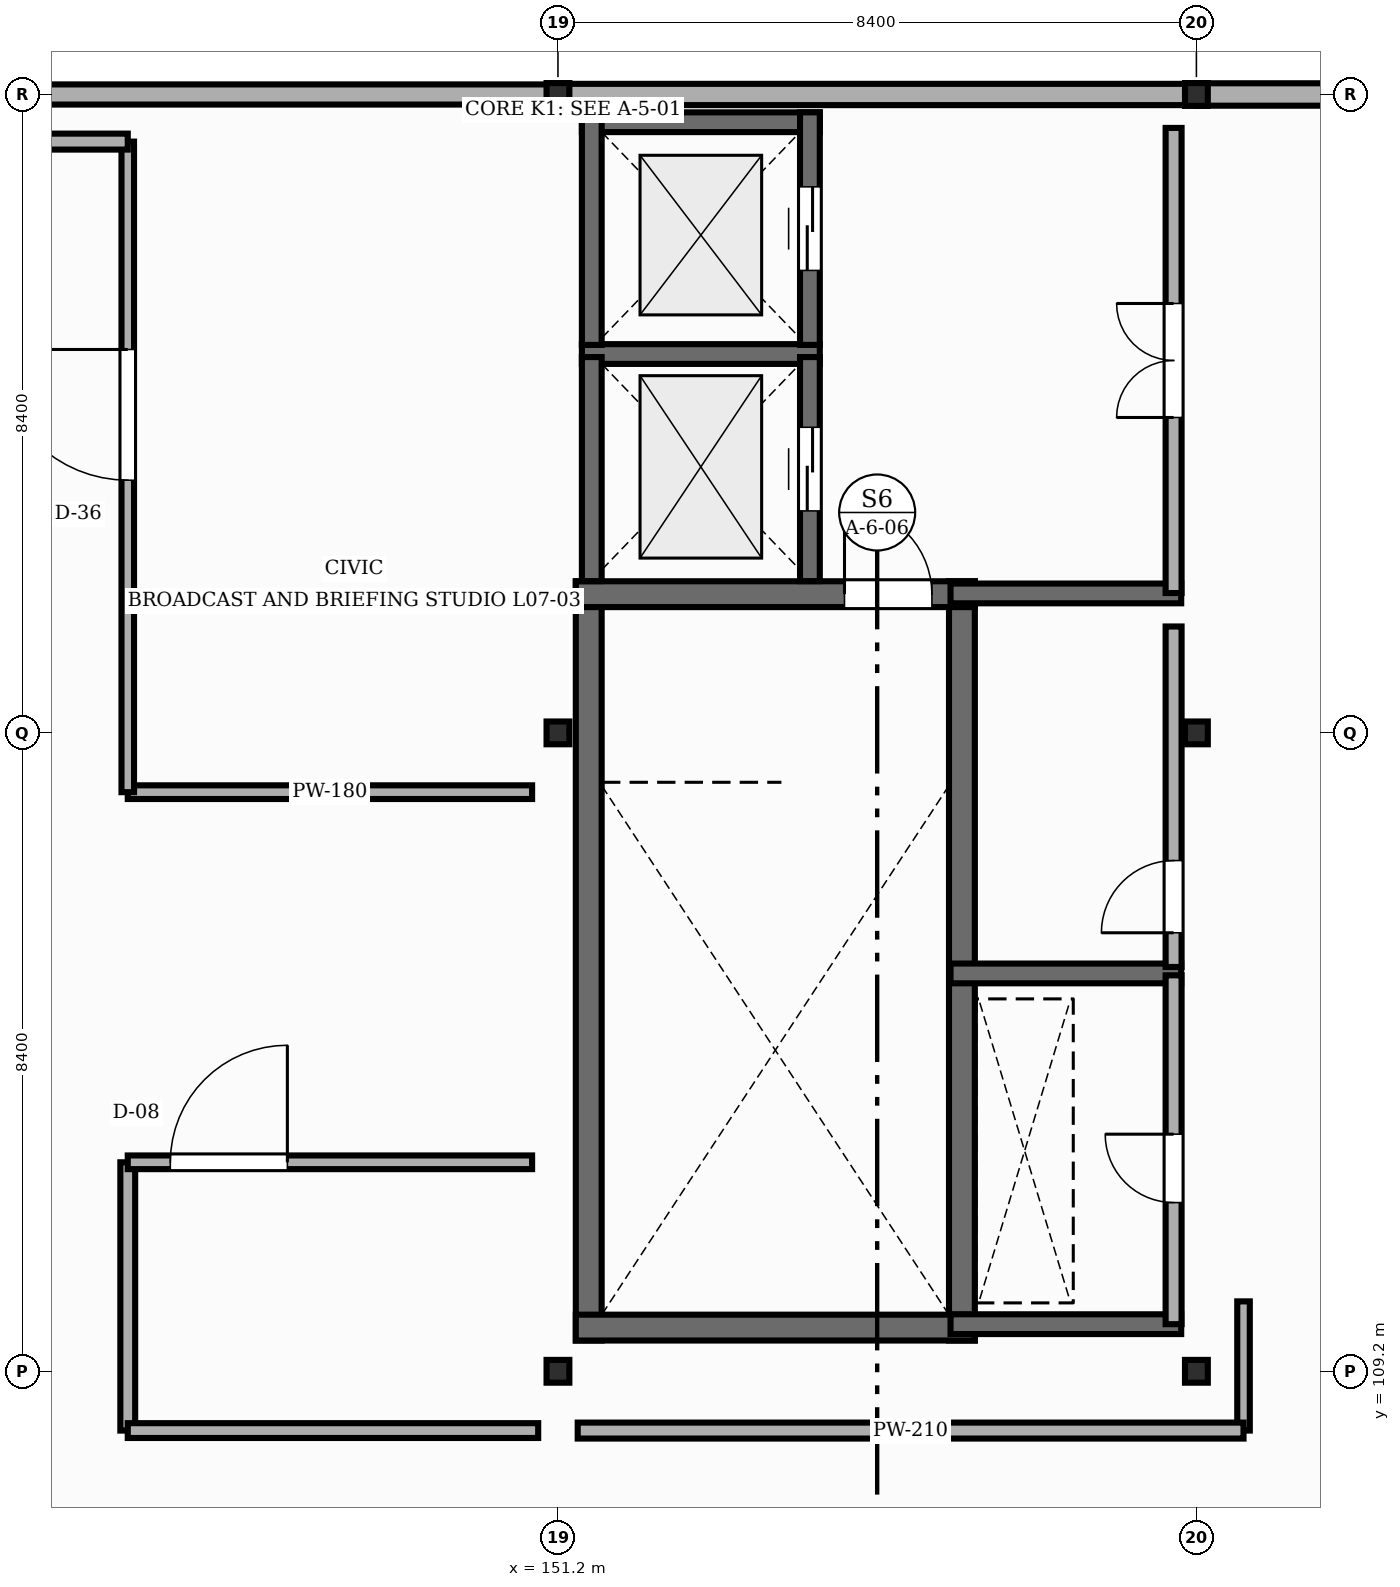
"""IFC4 building model, lengths in metres.
Left out: names, types, materials, properties, quantities, classifications, styles, units other than length and angle.
Written with IfcOpenShell. Run it as: python <this file> out.ifc"""

import sys

from ifc_helpers import new_model, si_unit, direction, frame, frame_2d, origin, origin_2d, place, context, subcontext, project, spatial, rectangle, i_section, extrude, element, fill, save


model = new_model("IFC4")
c1 = context("Model", 3, precision=1e-05, world=origin(), true_north=direction((0.0, 1.0)))
c2 = subcontext(c1, "Body", "Model", "MODEL_VIEW")
j1 = project(units=[si_unit("LENGTHUNIT", "METRE"), si_unit("PLANEANGLEUNIT", "RADIAN")], contexts=[c1])
p1 = place(None, origin())
s1 = spatial("IfcSite", under=j1, at=p1, CompositionType="ELEMENT")
p2 = place(p1, origin())
s2 = spatial("IfcBuilding", under=s1, at=p2, CompositionType="ELEMENT")
p3 = place(p2, frame((0.0, 0.0, 30.15)))
s3 = spatial("IfcBuildingStorey", under=s2, at=p3, CompositionType="ELEMENT", Elevation=30.15)
for number, where, z_axis, x_axis in (
    (1, (151.2, 109.2, 0.0), (0.0, 0.0, 1.0), (1.0, 0.0, 0.0)),
    (2, (151.2, 117.6, 0.0), (0.0, 0.0, 1.0), (1.0, 0.0, 0.0)),
    (3, (151.2, 126.0, 0.0), (0.0, 0.0, 1.0), (1.0, 0.0, 0.0)),
    (4, (159.6, 109.2, 0.0), (0.0, 0.0, 1.0), (1.0, 0.0, 0.0)),
    (5, (159.6, 117.6, 0.0), (0.0, 0.0, 1.0), (1.0, 0.0, 0.0)),
    (6, (159.6, 126.0, 0.0), (0.0, 0.0, 1.0), (1.0, 0.0, 0.0)),
):
    element("IfcColumn", number, at=place(p3, frame(where, z_axis=z_axis, x_axis=x_axis)), inside=s3, PredefinedType="COLUMN", context=c2, shape_type="SweptSolid", body=[
        extrude(i_section(OverallWidth=0.3, OverallDepth=0.3, WebThickness=0.011, FlangeThickness=0.019, FilletRadius=0.027, at=origin_2d()), origin(), (0.0, 0.0, 1.0), 4.2),
    ])
p4 = place(p3, frame((167.992, 126.0, 0.0), z_axis=(0.0, 0.0, 1.0), x_axis=(-1.0, 0.0, 0.0)))
e7 = element("IfcWall", 7, at=p4, inside=s3, PredefinedType="STANDARD", context=c2, shape_type="SweptSolid", body=[
    extrude(rectangle(XDim=8.384, YDim=0.295, at=frame_2d((4.192, 0.0))), origin(), (0.0, 0.0, 1.0), 3.662),
])
p5 = place(p3, frame((159.592, 126.0, 0.0), z_axis=(0.0, 0.0, 1.0), x_axis=(-1.0, 0.0, 0.0)))
e8 = element("IfcWall", 8, at=p5, inside=s3, PredefinedType="STANDARD", context=c2, shape_type="SweptSolid", body=[
    extrude(rectangle(XDim=8.384, YDim=0.28, at=frame_2d((4.192, 0.0))), origin(), (0.0, 0.0, 1.0), 3.692),
])
p6 = place(p3, frame((151.192, 126.0, 0.0), z_axis=(0.0, 0.0, 1.0), x_axis=(-1.0, 0.0, 0.0)))
e9 = element("IfcWall", 9, at=p6, inside=s3, PredefinedType="STANDARD", context=c2, shape_type="SweptSolid", body=[
    extrude(rectangle(XDim=8.384, YDim=0.265, at=frame_2d((4.192, 0.0))), origin(), (0.0, 0.0, 1.0), 3.662),
])
for number, where, z_axis, x_axis in (
    (10, (151.605, 109.605, 0.0), (0.0, 0.0, 1.0), (0.0, 1.0, 0.0)),
    (11, (156.515, 109.605, 0.0), (0.0, 0.0, 1.0), (0.0, 1.0, 0.0)),
):
    element("IfcWall", number, at=place(p3, frame(where, z_axis=z_axis, x_axis=x_axis)), inside=s3, PredefinedType="SHEAR", context=c2, shape_type="SweptSolid", body=[
        extrude(rectangle(XDim=9.99, YDim=0.34, at=frame_2d((4.995, 0.0))), origin(), (0.0, 0.0, 1.0), 4.0),
    ])
p7 = place(p3, frame((151.435, 109.775, 0.0), z_axis=(0.0, 0.0, 1.0), x_axis=(1.0, 0.0, 0.0)))
e12 = element("IfcWall", 12, at=p7, inside=s3, PredefinedType="SHEAR", context=c2, shape_type="SweptSolid", body=[
    extrude(rectangle(XDim=5.25, YDim=0.34, at=frame_2d((2.625, 0.0))), origin(), (0.0, 0.0, 1.0), 4.0),
])
p8 = place(p3, frame((151.435, 119.425, 0.0), z_axis=(0.0, 0.0, 1.0), x_axis=(1.0, 0.0, 0.0)))
e13 = element("IfcWall", 13, at=p8, inside=s3, PredefinedType="SHEAR", context=c2, shape_type="SweptSolid", body=[
    extrude(rectangle(XDim=5.25, YDim=0.34, at=frame_2d((2.625, 0.0))), origin(), (0.0, 0.0, 1.0), 4.0),
])
p9 = place(p8, frame((3.535, 0.0, 0.0)))
e14 = element("IfcOpeningElement", 14, at=p9, cuts=e13, PredefinedType="OPENING", context=c2, shape_type="SweptSolid", body=[
    extrude(rectangle(XDim=1.15, YDim=2.15, at=frame_2d((0.575, 1.075))), frame((0.0, 0.18, 0.0), z_axis=(0.0, -1.0, 0.0), x_axis=(1.0, 0.0, 0.0)), (0.0, 0.0, 1.0), 0.36),
])
p10 = place(p3, frame((151.515, 122.585, 0.0), z_axis=(0.0, 0.0, 1.0), x_axis=(1.0, 0.0, 0.0)))
e15 = element("IfcWall", 15, at=p10, inside=s3, PredefinedType="SHEAR", context=c2, shape_type="SweptSolid", body=[
    extrude(rectangle(XDim=3.13, YDim=0.26, at=frame_2d((1.565, 0.0))), origin(), (0.0, 0.0, 1.0), 4.0),
])
p11 = place(p3, frame((151.645, 119.597, 0.0), z_axis=(0.0, 0.0, 1.0), x_axis=(0.0, 1.0, 0.0)))
e16 = element("IfcWall", 16, at=p11, inside=s3, PredefinedType="SHEAR", context=c2, shape_type="SweptSolid", body=[
    extrude(rectangle(XDim=2.948, YDim=0.26, at=frame_2d((1.474, 0.0))), origin(), (0.0, 0.0, 1.0), 4.0),
])
p12 = place(p3, frame((154.515, 119.597, 0.0), z_axis=(0.0, 0.0, 1.0), x_axis=(0.0, 1.0, 0.0)))
e17 = element("IfcWall", 17, at=p12, inside=s3, PredefinedType="SHEAR", context=c2, shape_type="SweptSolid", body=[
    extrude(rectangle(XDim=2.948, YDim=0.26, at=frame_2d((1.474, 0.0))), origin(), (0.0, 0.0, 1.0), 4.0),
])
p13 = place(p12, frame((0.924, 0.0, 0.0)))
e18 = element("IfcOpeningElement", 18, at=p13, cuts=e17, PredefinedType="OPENING", context=c2, shape_type="SweptSolid", body=[
    extrude(rectangle(XDim=1.1, YDim=2.15, at=frame_2d((0.55, 1.075))), frame((0.0, 0.14, 0.0), z_axis=(0.0, -1.0, 0.0), x_axis=(1.0, 0.0, 0.0)), (0.0, 0.0, 1.0), 0.28),
])
p14 = place(p3, frame((151.515, 125.635, 0.0), z_axis=(0.0, 0.0, 1.0), x_axis=(1.0, 0.0, 0.0)))
e19 = element("IfcWall", 19, at=p14, inside=s3, PredefinedType="SHEAR", context=c2, shape_type="SweptSolid", body=[
    extrude(rectangle(XDim=3.13, YDim=0.26, at=frame_2d((1.565, 0.0))), origin(), (0.0, 0.0, 1.0), 4.0),
])
p15 = place(p3, frame((151.645, 122.705, 0.0), z_axis=(0.0, 0.0, 1.0), x_axis=(0.0, 1.0, 0.0)))
e20 = element("IfcWall", 20, at=p15, inside=s3, PredefinedType="SHEAR", context=c2, shape_type="SweptSolid", body=[
    extrude(rectangle(XDim=3.06, YDim=0.26, at=frame_2d((1.53, 0.0))), origin(), (0.0, 0.0, 1.0), 4.0),
])
p16 = place(p3, frame((154.515, 122.705, 0.0), z_axis=(0.0, 0.0, 1.0), x_axis=(0.0, 1.0, 0.0)))
e21 = element("IfcWall", 21, at=p16, inside=s3, PredefinedType="SHEAR", context=c2, shape_type="SweptSolid", body=[
    extrude(rectangle(XDim=3.06, YDim=0.26, at=frame_2d((1.53, 0.0))), origin(), (0.0, 0.0, 1.0), 4.0),
])
p17 = place(p16, frame((0.98, 0.0, 0.0)))
e22 = element("IfcOpeningElement", 22, at=p17, cuts=e21, PredefinedType="OPENING", context=c2, shape_type="SweptSolid", body=[
    extrude(rectangle(XDim=1.1, YDim=2.15, at=frame_2d((0.55, 1.075))), frame((0.0, 0.14, 0.0), z_axis=(0.0, -1.0, 0.0), x_axis=(1.0, 0.0, 0.0)), (0.0, 0.0, 1.0), 0.28),
])
for number, where, z_axis, x_axis in (
    (23, (156.365, 109.82, 0.0), (0.0, 0.0, 1.0), (1.0, 0.0, 0.0)),
    (24, (156.365, 114.435, 0.0), (0.0, 0.0, 1.0), (1.0, 0.0, 0.0)),
    (25, (156.365, 119.435, 0.0), (0.0, 0.0, 1.0), (1.0, 0.0, 0.0)),
):
    element("IfcWall", number, at=place(p3, frame(where, z_axis=z_axis, x_axis=x_axis)), inside=s3, PredefinedType="SHEAR", context=c2, shape_type="SweptSolid", body=[
        extrude(rectangle(XDim=3.035, YDim=0.26, at=frame_2d((1.518, 0.0))), origin(), (0.0, 0.0, 1.0), 4.0),
    ])
p18 = place(p3, frame((159.3, 109.82, 0.0), z_axis=(0.0, 0.0, 1.0), x_axis=(0.0, 1.0, 0.0)))
e26 = element("IfcWall", 26, at=p18, inside=s3, PredefinedType="STANDARD", context=c2, shape_type="SweptSolid", body=[
    extrude(rectangle(XDim=4.59, YDim=0.21, at=frame_2d((2.295, 0.0))), origin(), (0.0, 0.0, 1.0), 3.662),
])
p19 = place(p18, frame((1.6, 0.0, 0.0)))
e27 = element("IfcOpeningElement", 27, at=p19, cuts=e26, PredefinedType="OPENING", context=c2, shape_type="SweptSolid", body=[
    extrude(rectangle(XDim=0.9, YDim=2.1, at=frame_2d((0.45, 1.05))), frame((0.0, 0.115, 0.0), z_axis=(0.0, -1.0, 0.0), x_axis=(1.0, 0.0, 0.0)), (0.0, 0.0, 1.0), 0.23),
])
p20 = place(p3, frame((159.3, 114.52, 0.0), z_axis=(0.0, 0.0, 1.0), x_axis=(0.0, 1.0, 0.0)))
e28 = element("IfcWall", 28, at=p20, inside=s3, PredefinedType="STANDARD", context=c2, shape_type="SweptSolid", body=[
    extrude(rectangle(XDim=4.48, YDim=0.21, at=frame_2d((2.24, 0.0))), origin(), (0.0, 0.0, 1.0), 3.662),
])
p21 = place(p20, frame((0.45, 0.0, 0.0)))
e29 = element("IfcOpeningElement", 29, at=p21, cuts=e28, PredefinedType="OPENING", context=c2, shape_type="SweptSolid", body=[
    extrude(rectangle(XDim=0.95, YDim=2.15, at=frame_2d((0.475, 1.075))), frame((0.0, 0.115, 0.0), z_axis=(0.0, -1.0, 0.0), x_axis=(1.0, 0.0, 0.0)), (0.0, 0.0, 1.0), 0.23),
])
p22 = place(p3, frame((159.3, 119.44, 0.0), z_axis=(0.0, 0.0, 1.0), x_axis=(0.0, 1.0, 0.0)))
e30 = element("IfcWall", 30, at=p22, inside=s3, PredefinedType="STANDARD", context=c2, shape_type="SweptSolid", body=[
    extrude(rectangle(XDim=6.12, YDim=0.21, at=frame_2d((3.06, 0.0))), origin(), (0.0, 0.0, 1.0), 3.752),
])
p23 = place(p22, frame((2.31, 0.0, 0.0)))
e31 = element("IfcOpeningElement", 31, at=p23, cuts=e30, PredefinedType="OPENING", context=c2, shape_type="SweptSolid", body=[
    extrude(rectangle(XDim=1.5, YDim=2.2, at=frame_2d((0.75, 1.1))), frame((0.0, 0.115, 0.0), z_axis=(0.0, -1.0, 0.0), x_axis=(1.0, 0.0, 0.0)), (0.0, 0.0, 1.0), 0.23),
])
p24 = place(p3, frame((150.86, 116.82, -0.004), z_axis=(0.0, 0.0, 1.0), x_axis=(-1.0, 0.0, 0.0)))
e32 = element("IfcWall", 32, at=p24, inside=s3, PredefinedType="STANDARD", context=c2, shape_type="SweptSolid", body=[
    extrude(rectangle(XDim=5.32, YDim=0.18, at=frame_2d((2.66, 0.0))), origin(), (0.0, 0.0, 1.0), 4.004),
])
p25 = place(p3, frame((145.54, 116.82, -0.004), z_axis=(0.0, 0.0, 1.0), x_axis=(0.0, 1.0, 0.0)))
e33 = element("IfcWall", 33, at=p25, inside=s3, PredefinedType="STANDARD", context=c2, shape_type="SweptSolid", body=[
    extrude(rectangle(XDim=8.56, YDim=0.165, at=frame_2d((4.28, 0.0))), origin(), (0.0, 0.0, 1.0), 4.004),
])
p26 = place(p25, frame((4.105, 0.0, 0.0)))
e34 = element("IfcOpeningElement", 34, at=p26, cuts=e33, PredefinedType="OPENING", context=c2, shape_type="SweptSolid", body=[
    extrude(rectangle(XDim=1.72, YDim=2.3, at=frame_2d((0.86, 1.15))), frame((0.0, 0.093, 0.0), z_axis=(0.0, -1.0, 0.0), x_axis=(1.0, 0.0, 0.0)), (0.0, 0.0, 1.0), 0.185),
])
p27 = place(p3, frame((145.54, 125.38, -0.004), z_axis=(0.0, 0.0, 1.0), x_axis=(-1.0, 0.0, 0.0)))
e35 = element("IfcWall", 35, at=p27, inside=s3, PredefinedType="STANDARD", context=c2, shape_type="SweptSolid", body=[
    extrude(rectangle(XDim=2.12, YDim=0.21, at=frame_2d((1.06, 0.0))), origin(), (0.0, 0.0, 1.0), 4.004),
])
p28 = place(p3, frame((145.54, 108.42, -0.004), z_axis=(0.0, 0.0, 1.0), x_axis=(0.0, 1.0, 0.0)))
e36 = element("IfcWall", 36, at=p28, inside=s3, PredefinedType="STANDARD", context=c2, shape_type="SweptSolid", body=[
    extrude(rectangle(XDim=3.53, YDim=0.195, at=frame_2d((1.765, 0.0))), origin(), (0.0, 0.0, 1.0), 3.716),
])
p29 = place(p3, frame((145.54, 111.95, -0.004), z_axis=(0.0, 0.0, 1.0), x_axis=(1.0, 0.0, 0.0)))
e37 = element("IfcWall", 37, at=p29, inside=s3, PredefinedType="STANDARD", context=c2, shape_type="SweptSolid", body=[
    extrude(rectangle(XDim=5.32, YDim=0.18, at=frame_2d((2.66, 0.0))), origin(), (0.0, 0.0, 1.0), 4.004),
])
p30 = place(p29, frame((0.56, 0.0, 0.0)))
e38 = element("IfcOpeningElement", 38, at=p30, cuts=e37, PredefinedType="OPENING", context=c2, shape_type="SweptSolid", body=[
    extrude(rectangle(XDim=1.54, YDim=2.06, at=frame_2d((0.77, 1.03))), frame((0.0, 0.1, 0.0), z_axis=(0.0, -1.0, 0.0), x_axis=(1.0, 0.0, 0.0)), (0.0, 0.0, 1.0), 0.2),
])
p31 = place(p3, frame((160.22, 110.12, -0.004), z_axis=(0.0, 0.0, 1.0), x_axis=(0.0, -1.0, 0.0)))
e39 = element("IfcWall", 39, at=p31, inside=s3, PredefinedType="STANDARD", context=c2, shape_type="SweptSolid", body=[
    extrude(rectangle(XDim=1.7, YDim=0.165, at=frame_2d((0.85, 0.0))), origin(), (0.0, 0.0, 1.0), 4.004),
])
p32 = place(p3, frame((160.22, 108.42, -0.004), z_axis=(0.0, 0.0, 1.0), x_axis=(-1.0, 0.0, 0.0)))
e40 = element("IfcWall", 40, at=p32, inside=s3, PredefinedType="STANDARD", context=c2, shape_type="SweptSolid", body=[
    extrude(rectangle(XDim=8.76, YDim=0.21, at=frame_2d((4.38, 0.0))), origin(), (0.0, 0.0, 1.0), 4.004),
])
p33 = place(p3, frame((150.94, 108.42, -0.004), z_axis=(0.0, 0.0, 1.0), x_axis=(-1.0, 0.0, 0.0)))
e41 = element("IfcWall", 41, at=p33, inside=s3, PredefinedType="STANDARD", context=c2, shape_type="SweptSolid", body=[
    extrude(rectangle(XDim=5.4, YDim=0.195, at=frame_2d((2.7, 0.0))), origin(), (0.0, 0.0, 1.0), 4.004),
])
p34 = place(p9, origin())
e42 = element("IfcDoor", 42, at=p34, inside=s3, OperationType="SINGLE_SWING_LEFT", PredefinedType="DOOR", context=c2, shape_type="SweptSolid", body=[
    extrude(rectangle(XDim=1.15, YDim=2.15, at=frame_2d((0.575, 1.075))), frame((0.0, 0.025, 0.0), z_axis=(0.0, -1.0, 0.0), x_axis=(1.0, 0.0, 0.0)), (0.0, 0.0, 1.0), 0.05),
])
fill(e14, e42)
p35 = place(p13, origin())
e43 = element("IfcDoor", 43, at=p35, inside=s3, OperationType="DOUBLE_DOOR_SLIDING", PredefinedType="DOOR", context=c2, shape_type="SweptSolid", body=[
    extrude(rectangle(XDim=1.1, YDim=2.15, at=frame_2d((0.55, 1.075))), frame((0.0, 0.025, 0.0), z_axis=(0.0, -1.0, 0.0), x_axis=(1.0, 0.0, 0.0)), (0.0, 0.0, 1.0), 0.05),
])
fill(e18, e43)
p36 = place(p17, origin())
e44 = element("IfcDoor", 44, at=p36, inside=s3, OperationType="DOUBLE_DOOR_SLIDING", PredefinedType="DOOR", context=c2, shape_type="SweptSolid", body=[
    extrude(rectangle(XDim=1.1, YDim=2.15, at=frame_2d((0.55, 1.075))), frame((0.0, 0.025, 0.0), z_axis=(0.0, -1.0, 0.0), x_axis=(1.0, 0.0, 0.0)), (0.0, 0.0, 1.0), 0.05),
])
fill(e22, e44)
p37 = place(p19, origin())
e45 = element("IfcDoor", 45, at=p37, inside=s3, OperationType="SINGLE_SWING_RIGHT", PredefinedType="DOOR", context=c2, shape_type="SweptSolid", body=[
    extrude(rectangle(XDim=0.9, YDim=2.1, at=frame_2d((0.45, 1.05))), frame((0.0, 0.025, 0.0), z_axis=(0.0, -1.0, 0.0), x_axis=(1.0, 0.0, 0.0)), (0.0, 0.0, 1.0), 0.05),
])
fill(e27, e45)
p38 = place(p21, origin())
e46 = element("IfcDoor", 46, at=p38, inside=s3, OperationType="SINGLE_SWING_LEFT", PredefinedType="DOOR", context=c2, shape_type="SweptSolid", body=[
    extrude(rectangle(XDim=0.95, YDim=2.15, at=frame_2d((0.475, 1.075))), frame((0.0, 0.025, 0.0), z_axis=(0.0, -1.0, 0.0), x_axis=(1.0, 0.0, 0.0)), (0.0, 0.0, 1.0), 0.05),
])
fill(e29, e46)
p39 = place(p23, origin())
e47 = element("IfcDoor", 47, at=p39, inside=s3, OperationType="DOUBLE_DOOR_SINGLE_SWING", PredefinedType="DOOR", context=c2, shape_type="SweptSolid", body=[
    extrude(rectangle(XDim=1.5, YDim=2.2, at=frame_2d((0.75, 1.1))), frame((0.0, 0.025, 0.0), z_axis=(0.0, -1.0, 0.0), x_axis=(1.0, 0.0, 0.0)), (0.0, 0.0, 1.0), 0.05),
])
fill(e31, e47)
p40 = place(p26, origin())
e48 = element("IfcDoor", 48, at=p40, inside=s3, OperationType="SINGLE_SWING_RIGHT", PredefinedType="DOOR", context=c2, shape_type="SweptSolid", body=[
    extrude(rectangle(XDim=1.72, YDim=2.3, at=frame_2d((0.86, 1.15))), frame((0.0, 0.025, 0.0), z_axis=(0.0, -1.0, 0.0), x_axis=(1.0, 0.0, 0.0)), (0.0, 0.0, 1.0), 0.05),
])
fill(e34, e48)
p41 = place(p30, origin())
e49 = element("IfcDoor", 49, at=p41, inside=s3, OperationType="SINGLE_SWING_RIGHT", PredefinedType="DOOR", context=c2, shape_type="SweptSolid", body=[
    extrude(rectangle(XDim=1.54, YDim=2.06, at=frame_2d((0.77, 1.03))), frame((0.0, 0.025, 0.0), z_axis=(0.0, -1.0, 0.0), x_axis=(1.0, 0.0, 0.0)), (0.0, 0.0, 1.0), 0.05),
])
fill(e38, e49)
save(model, sys.argv[1])
